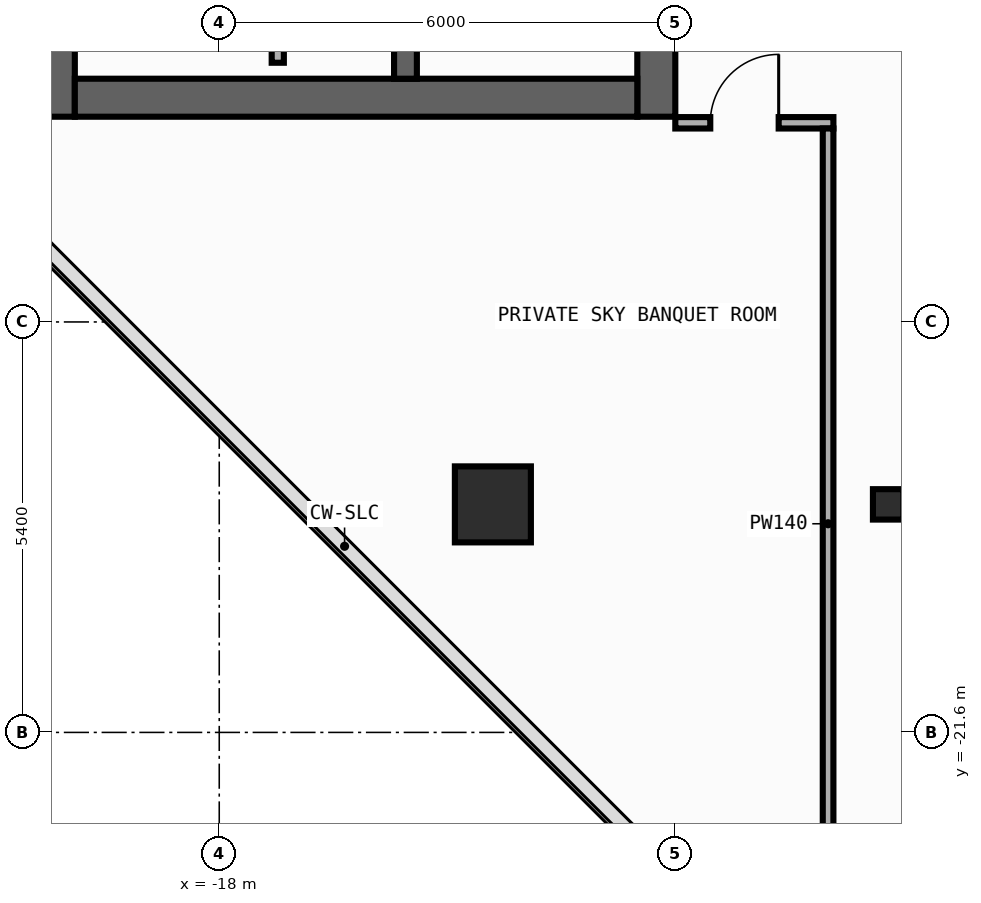
"""IFC4 building model, lengths in metres.
Left out: names, types, materials, properties, quantities, classifications, styles, units other than length and angle.
Written with IfcOpenShell. Run it as: python <this file> out.ifc"""

import sys

from ifc_helpers import new_model, si_unit, direction, frame, frame_2d, origin, origin_2d, place, context, subcontext, project, spatial, rectangle, circle, i_section, extrude, element, fill, save


model = new_model("IFC4")
c1 = context("Model", 3, precision=1e-05, world=origin(), true_north=direction((0.0, 1.0)))
c2 = subcontext(c1, "Body", "Model", "MODEL_VIEW")
j1 = project(units=[si_unit("LENGTHUNIT", "METRE"), si_unit("PLANEANGLEUNIT", "RADIAN")], contexts=[c1])
p1 = place(None, origin())
s1 = spatial("IfcSite", under=j1, at=p1, CompositionType="ELEMENT")
p2 = place(p1, origin())
s2 = spatial("IfcBuilding", under=s1, at=p2, CompositionType="ELEMENT")
p3 = place(p2, frame((0.0, 0.0, 315.6)))
s3 = spatial("IfcBuildingStorey", under=s2, at=p3, CompositionType="ELEMENT", Elevation=315.6)
p4 = place(p3, frame((-20.15, -13.5, 0.0), z_axis=(0.0, 0.0, 1.0), x_axis=(0.0, 1.0, 0.0)))
e1 = element("IfcWall", 1, at=p4, inside=s3, PredefinedType="SHEAR", context=c2, shape_type="SweptSolid", body=[
    extrude(rectangle(XDim=27.0, YDim=0.5, at=frame_2d((13.5, 0.0))), origin(), (0.0, 0.0, 1.0), 4.54),
])
p5 = place(p3, frame((-12.25, -13.5, 0.0), z_axis=(0.0, 0.0, 1.0), x_axis=(0.0, 1.0, 0.0)))
e2 = element("IfcWall", 2, at=p5, inside=s3, PredefinedType="SHEAR", context=c2, shape_type="SweptSolid", body=[
    extrude(rectangle(XDim=27.0, YDim=0.5, at=frame_2d((13.5, 0.0))), origin(), (0.0, 0.0, 1.0), 4.54),
])
p6 = place(p5, frame((15.175, 0.0, 0.0)))
e3 = element("IfcOpeningElement", 3, at=p6, cuts=e2, PredefinedType="OPENING", context=c2, shape_type="SweptSolid", body=[
    extrude(rectangle(XDim=0.85, YDim=2.1, at=frame_2d((0.425, 1.05))), frame((0.0, 0.26, 0.0), z_axis=(0.0, -1.0, 0.0), x_axis=(1.0, 0.0, 0.0)), (0.0, 0.0, 1.0), 0.52),
])
p7 = place(p5, frame((21.275, 0.0, 0.0)))
e4 = element("IfcOpeningElement", 4, at=p7, cuts=e2, PredefinedType="OPENING", context=c2, shape_type="SweptSolid", body=[
    extrude(rectangle(XDim=0.85, YDim=2.1, at=frame_2d((0.425, 1.05))), frame((0.0, 0.26, 0.0), z_axis=(0.0, -1.0, 0.0), x_axis=(1.0, 0.0, 0.0)), (0.0, 0.0, 1.0), 0.52),
])
p8 = place(p5, frame((4.275, 0.0, 0.0)))
e5 = element("IfcOpeningElement", 5, at=p8, cuts=e2, PredefinedType="OPENING", context=c2, shape_type="SweptSolid", body=[
    extrude(rectangle(XDim=0.85, YDim=2.1, at=frame_2d((0.425, 1.05))), frame((0.0, 0.26, 0.0), z_axis=(0.0, -1.0, 0.0), x_axis=(1.0, 0.0, 0.0)), (0.0, 0.0, 1.0), 0.52),
])
p9 = place(p5, frame((10.275, 0.0, 0.0)))
e6 = element("IfcOpeningElement", 6, at=p9, cuts=e2, PredefinedType="OPENING", context=c2, shape_type="SweptSolid", body=[
    extrude(rectangle(XDim=0.85, YDim=2.1, at=frame_2d((0.425, 1.05))), frame((0.0, 0.26, 0.0), z_axis=(0.0, -1.0, 0.0), x_axis=(1.0, 0.0, 0.0)), (0.0, 0.0, 1.0), 0.52),
])
p10 = place(p5, frame((12.725, 0.0, 0.0)))
e7 = element("IfcOpeningElement", 7, at=p10, cuts=e2, PredefinedType="OPENING", context=c2, shape_type="SweptSolid", body=[
    extrude(rectangle(XDim=1.15, YDim=2.2, at=frame_2d((0.575, 1.1))), frame((0.0, 0.26, 0.0), z_axis=(0.0, -1.0, 0.0), x_axis=(1.0, 0.0, 0.0)), (0.0, 0.0, 1.0), 0.52),
])
p11 = place(p5, frame((1.625, 0.0, 0.0)))
e8 = element("IfcOpeningElement", 8, at=p11, cuts=e2, PredefinedType="OPENING", context=c2, shape_type="SweptSolid", body=[
    extrude(rectangle(XDim=0.85, YDim=2.1, at=frame_2d((0.425, 1.05))), frame((0.0, 0.26, 0.0), z_axis=(0.0, -1.0, 0.0), x_axis=(1.0, 0.0, 0.0)), (0.0, 0.0, 1.0), 0.52),
])
p12 = place(p3, frame((-19.9, -13.25, 0.0), z_axis=(0.0, 0.0, 1.0), x_axis=(1.0, 0.0, 0.0)))
e9 = element("IfcWall", 9, at=p12, inside=s3, PredefinedType="SHEAR", context=c2, shape_type="SweptSolid", body=[
    extrude(rectangle(XDim=7.4, YDim=0.5, at=frame_2d((3.7, 0.0))), origin(), (0.0, 0.0, 1.0), 4.54),
])
p13 = place(p3, frame((-15.55, -13.0, 0.0), z_axis=(0.0, 0.0, 1.0), x_axis=(0.0, 1.0, 0.0)))
e10 = element("IfcWall", 10, at=p13, inside=s3, PredefinedType="SHEAR", context=c2, shape_type="SweptSolid", body=[
    extrude(rectangle(XDim=26.0, YDim=0.3, at=frame_2d((13.0, 0.0))), origin(), (0.0, 0.0, 1.0), 4.54),
])
p14 = place(p13, frame((12.225, 0.0, 0.0)))
e11 = element("IfcOpeningElement", 11, at=p14, cuts=e10, PredefinedType="OPENING", context=c2, shape_type="SweptSolid", body=[
    extrude(rectangle(XDim=1.15, YDim=2.2, at=frame_2d((0.575, 1.1))), frame((0.0, 0.16, 0.0), z_axis=(0.0, -1.0, 0.0), x_axis=(1.0, 0.0, 0.0)), (0.0, 0.0, 1.0), 0.32),
])
p15 = place(p13, frame((1.125, 0.0, 0.0)))
e12 = element("IfcOpeningElement", 12, at=p15, cuts=e10, PredefinedType="OPENING", context=c2, shape_type="SweptSolid", body=[
    extrude(rectangle(XDim=0.85, YDim=2.1, at=frame_2d((0.425, 1.05))), frame((0.0, 0.16, 0.0), z_axis=(0.0, -1.0, 0.0), x_axis=(1.0, 0.0, 0.0)), (0.0, 0.0, 1.0), 0.32),
])
p16 = place(p3, frame((-9.2, -18.6, 0.0), z_axis=(0.0, 0.0, 1.0), x_axis=(1.0, 0.0, 0.0)))
e13 = element("IfcColumn", 13, at=p16, inside=s3, PredefinedType="COLUMN", context=c2, shape_type="SweptSolid", body=[
    extrude(i_section(OverallWidth=0.4, OverallDepth=0.4, WebThickness=0.013, FlangeThickness=0.021, FilletRadius=0.022, at=origin_2d()), origin(), (0.0, 0.0, 1.0), 4.8),
])
p17 = place(p3, frame((-14.4, -18.6, 0.0), z_axis=(0.0, 0.0, 1.0), x_axis=(1.0, 0.0, 0.0)))
e14 = element("IfcColumn", 14, at=p17, inside=s3, PredefinedType="COLUMN", context=c2, shape_type="SweptSolid", body=[
    extrude(circle(Radius=0.5, at=origin_2d()), origin(), (0.0, 0.0, 1.0), 4.8),
])
p18 = place(p3, frame((-17.23, -12.79, 0.0), z_axis=(0.0, 0.0, 1.0), x_axis=(0.0, 1.0, 0.0)))
e15 = element("IfcWall", 15, at=p18, inside=s3, PredefinedType="PARTITIONING", context=c2, shape_type="SweptSolid", body=[
    extrude(rectangle(XDim=2.32, YDim=0.16, at=frame_2d((1.16, 0.0))), origin(), (0.0, 0.0, 1.0), 4.54),
])
p19 = place(p18, frame((0.46, 0.0, 0.0)))
e16 = element("IfcOpeningElement", 16, at=p19, cuts=e15, PredefinedType="OPENING", context=c2, shape_type="SweptSolid", body=[
    extrude(rectangle(XDim=0.85, YDim=2.1, at=frame_2d((0.425, 1.05))), frame((0.0, 0.09, 0.0), z_axis=(0.0, -1.0, 0.0), x_axis=(1.0, 0.0, 0.0)), (0.0, 0.0, 1.0), 0.18),
])
p20 = place(p3, frame((-12.0, -13.58, 0.0), z_axis=(0.0, 0.0, 1.0), x_axis=(1.0, 0.0, 0.0)))
e17 = element("IfcWall", 17, at=p20, inside=s3, PredefinedType="PARTITIONING", context=c2, shape_type="SweptSolid", body=[
    extrude(rectangle(XDim=2.08, YDim=0.15, at=frame_2d((1.04, 0.0))), origin(), (0.0, 0.0, 1.0), 4.54),
])
p21 = place(p20, frame((0.46, 0.0, 0.0)))
e18 = element("IfcOpeningElement", 18, at=p21, cuts=e17, PredefinedType="OPENING", context=c2, shape_type="SweptSolid", body=[
    extrude(rectangle(XDim=0.9, YDim=2.15, at=frame_2d((0.45, 1.075))), frame((0.0, 0.085, 0.0), z_axis=(0.0, -1.0, 0.0), x_axis=(1.0, 0.0, 0.0)), (0.0, 0.0, 1.0), 0.17),
])
p22 = place(p3, frame((-9.99, -24.055, 0.0), z_axis=(0.0, 0.0, 1.0), x_axis=(0.0, 1.0, 0.0)))
e19 = element("IfcWall", 19, at=p22, inside=s3, PredefinedType="PARTITIONING", context=c2, shape_type="SweptSolid", body=[
    extrude(rectangle(XDim=10.4, YDim=0.14, at=frame_2d((5.2, 0.0))), origin(), (0.0, 0.0, 1.0), 4.54),
])
p23 = place(p21, origin())
e20 = element("IfcDoor", 20, at=p23, inside=s3, OperationType="SINGLE_SWING_RIGHT", PredefinedType="DOOR", context=c2, shape_type="SweptSolid", body=[
    extrude(rectangle(XDim=0.9, YDim=2.15, at=frame_2d((0.45, 1.075))), frame((0.0, 0.025, 0.0), z_axis=(0.0, -1.0, 0.0), x_axis=(1.0, 0.0, 0.0)), (0.0, 0.0, 1.0), 0.05),
])
fill(e18, e20)
save(model, sys.argv[1])
